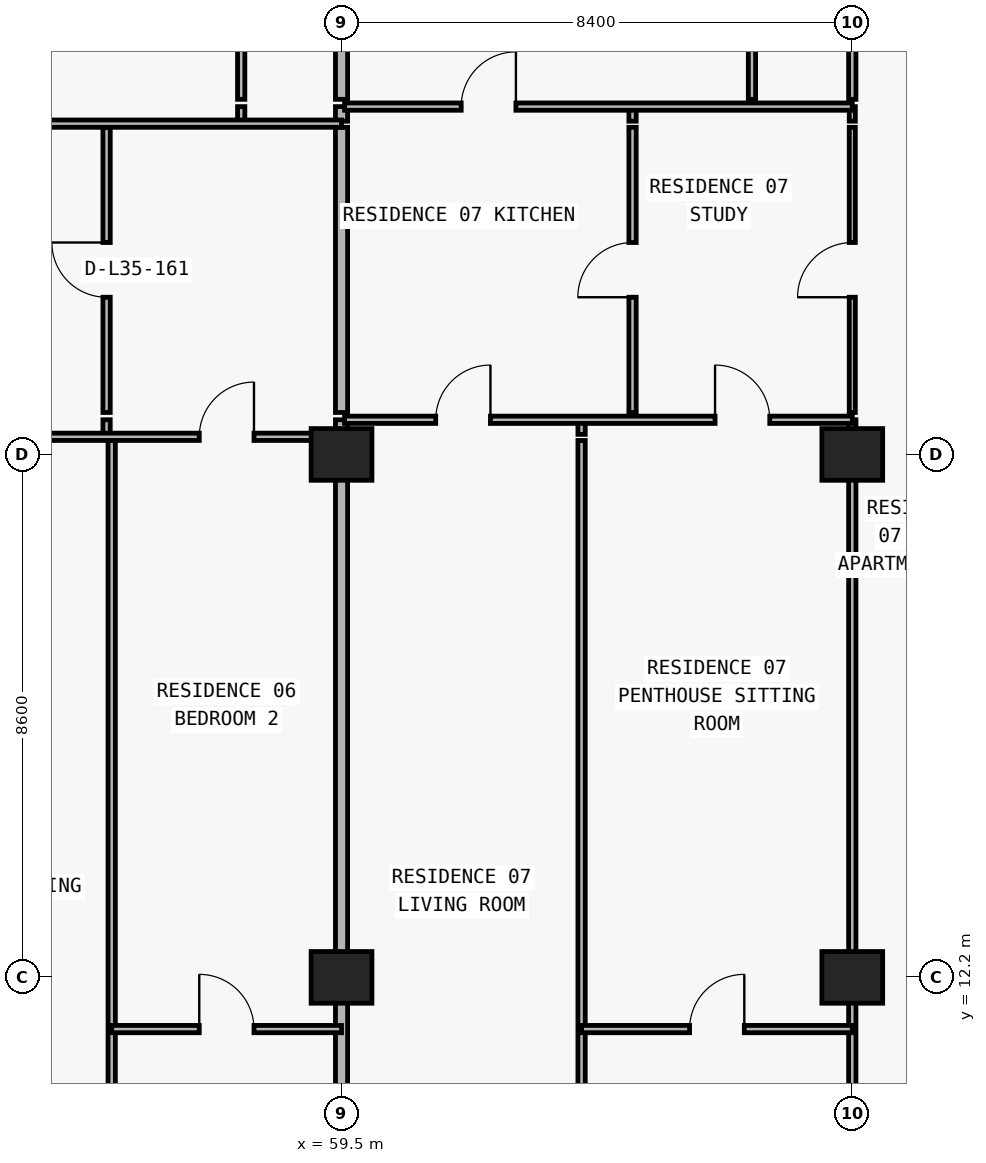
"""IFC4 building model, lengths in metres.
Left out: names, types, materials, properties, quantities, classifications, styles, units other than length and angle.
Written with IfcOpenShell. Run it as: python <this file> out.ifc"""

import sys

from ifc_helpers import new_model, si_unit, direction, frame, frame_2d, origin, origin_2d, place, context, subcontext, project, spatial, rectangle, extrude, element, fill, save


model = new_model("IFC4")
c1 = context("Model", 3, precision=1e-05, world=origin(), true_north=direction((0.0, 1.0)))
c2 = subcontext(c1, "Body", "Model", "MODEL_VIEW")
j1 = project(units=[si_unit("LENGTHUNIT", "METRE"), si_unit("PLANEANGLEUNIT", "RADIAN")], contexts=[c1])
p1 = place(None, origin())
s1 = spatial("IfcSite", under=j1, at=p1, CompositionType="ELEMENT")
p2 = place(p1, origin())
s2 = spatial("IfcBuilding", under=s1, at=p2, CompositionType="ELEMENT")
p3 = place(p2, frame((0.0, 0.0, 129.0)))
s3 = spatial("IfcBuildingStorey", under=s2, at=p3, CompositionType="ELEMENT", Elevation=129.0)
for number, where, z_axis, x_axis in (
    (1, (59.5, 12.2, 0.0), (0.0, 0.0, 1.0), (1.0, 0.0, 0.0)),
    (2, (67.9, 12.2, 0.0), (0.0, 0.0, 1.0), (1.0, 0.0, 0.0)),
    (3, (59.5, 20.8, 0.0), (0.0, 0.0, 1.0), (1.0, 0.0, 0.0)),
    (4, (67.9, 20.8, 0.0), (0.0, 0.0, 1.0), (1.0, 0.0, 0.0)),
):
    element("IfcColumn", number, at=place(p3, frame(where, z_axis=z_axis, x_axis=x_axis)), inside=s3, PredefinedType="COLUMN", context=c2, shape_type="SweptSolid", body=[
        extrude(rectangle(XDim=1.0, YDim=0.85, at=origin_2d()), origin(), (0.0, 0.0, 1.0), 3.05),
    ])
p4 = place(p3, frame((55.636, 21.13, 0.0), z_axis=(0.0, 0.0, 1.0), x_axis=(0.0, 1.0, 0.0)))
e5 = element("IfcWall", 5, at=p4, inside=s3, PredefinedType="PARTITIONING", context=c2, shape_type="SweptSolid", body=[
    extrude(rectangle(XDim=0.24, YDim=0.12, at=frame_2d((0.12, 0.0))), origin(), (0.0, 0.0, 1.0), 3.05),
])
p5 = place(p3, frame((55.636, 21.49, 0.0), z_axis=(0.0, 0.0, 1.0), x_axis=(0.0, 1.0, 0.0)))
e6 = element("IfcWall", 6, at=p5, inside=s3, PredefinedType="PARTITIONING", context=c2, shape_type="SweptSolid", body=[
    extrude(rectangle(XDim=4.69, YDim=0.12, at=frame_2d((2.345, 0.0))), origin(), (0.0, 0.0, 1.0), 3.05),
])
p6 = place(p5, frame((1.895, 0.0, 0.0)))
e7 = element("IfcOpeningElement", 7, at=p6, cuts=e6, PredefinedType="OPENING", context=c2, shape_type="SweptSolid", body=[
    extrude(rectangle(XDim=0.9, YDim=2.15, at=frame_2d((0.45, 1.075))), frame((0.0, 0.07, 0.0), z_axis=(0.0, -1.0, 0.0), x_axis=(1.0, 0.0, 0.0)), (0.0, 0.0, 1.0), 0.14),
])
p7 = place(p3, frame((55.72, 8.84, 0.0), z_axis=(0.0, 0.0, 1.0), x_axis=(0.0, 1.0, 0.0)))
e8 = element("IfcWall", 8, at=p7, inside=s3, PredefinedType="PARTITIONING", context=c2, shape_type="SweptSolid", body=[
    extrude(rectangle(XDim=12.19, YDim=0.12, at=frame_2d((6.095, 0.0))), origin(), (0.0, 0.0, 1.0), 3.05),
])
p8 = place(p3, frame((57.85, 26.28, 0.0), z_axis=(0.0, 0.0, 1.0), x_axis=(0.0, 1.0, 0.0)))
e9 = element("IfcWall", 9, at=p8, inside=s3, PredefinedType="PARTITIONING", context=c2, shape_type="SweptSolid", body=[
    extrude(rectangle(XDim=0.24, YDim=0.12, at=frame_2d((0.12, 0.0))), origin(), (0.0, 0.0, 1.0), 3.05),
])
p9 = place(p3, frame((57.85, 26.64, 0.0), z_axis=(0.0, 0.0, 1.0), x_axis=(0.0, 1.0, 0.0)))
e10 = element("IfcWall", 10, at=p9, inside=s3, PredefinedType="PARTITIONING", context=c2, shape_type="SweptSolid", body=[
    extrude(rectangle(XDim=8.06, YDim=0.12, at=frame_2d((4.03, 0.0))), origin(), (0.0, 0.0, 1.0), 3.05),
])
p10 = place(p9, frame((3.755, 0.0, 0.0)))
e11 = element("IfcOpeningElement", 11, at=p10, cuts=e10, PredefinedType="OPENING", context=c2, shape_type="SweptSolid", body=[
    extrude(rectangle(XDim=0.85, YDim=2.1, at=frame_2d((0.425, 1.05))), frame((0.0, 0.07, 0.0), z_axis=(0.0, -1.0, 0.0), x_axis=(1.0, 0.0, 0.0)), (0.0, 0.0, 1.0), 0.14),
])
p11 = place(p3, frame((59.5, 8.84, 0.0), z_axis=(0.0, 0.0, 1.0), x_axis=(0.0, 1.0, 0.0)))
e12 = element("IfcWall", 12, at=p11, inside=s3, PredefinedType="PARTITIONING", context=c2, shape_type="SweptSolid", body=[
    extrude(rectangle(XDim=12.19, YDim=0.2, at=frame_2d((6.095, 0.0))), origin(), (0.0, 0.0, 1.0), 2.174),
])
p12 = place(p3, frame((59.5, 21.13, 0.0), z_axis=(0.0, 0.0, 1.0), x_axis=(0.0, 1.0, 0.0)))
e13 = element("IfcWall", 13, at=p12, inside=s3, PredefinedType="PARTITIONING", context=c2, shape_type="SweptSolid", body=[
    extrude(rectangle(XDim=0.24, YDim=0.2, at=frame_2d((0.12, 0.0))), origin(), (0.0, 0.0, 1.0), 2.174),
])
p13 = place(p3, frame((59.5, 21.49, 0.0), z_axis=(0.0, 0.0, 1.0), x_axis=(0.0, 1.0, 0.0)))
e14 = element("IfcWall", 14, at=p13, inside=s3, PredefinedType="PARTITIONING", context=c2, shape_type="SweptSolid", body=[
    extrude(rectangle(XDim=4.69, YDim=0.2, at=frame_2d((2.345, 0.0))), origin(), (0.0, 0.0, 1.0), 2.174),
])
p14 = place(p3, frame((59.5, 26.28, 0.0), z_axis=(0.0, 0.0, 1.0), x_axis=(0.0, 1.0, 0.0)))
e15 = element("IfcWall", 15, at=p14, inside=s3, PredefinedType="PARTITIONING", context=c2, shape_type="SweptSolid", body=[
    extrude(rectangle(XDim=0.24, YDim=0.2, at=frame_2d((0.12, 0.0))), origin(), (0.0, 0.0, 1.0), 2.174),
])
p15 = place(p3, frame((59.5, 26.64, 0.0), z_axis=(0.0, 0.0, 1.0), x_axis=(0.0, 1.0, 0.0)))
e16 = element("IfcWall", 16, at=p15, inside=s3, PredefinedType="PARTITIONING", context=c2, shape_type="SweptSolid", body=[
    extrude(rectangle(XDim=8.06, YDim=0.2, at=frame_2d((4.03, 0.0))), origin(), (0.0, 0.0, 1.0), 2.174),
])
p16 = place(p3, frame((63.448, 8.84, 0.0), z_axis=(0.0, 0.0, 1.0), x_axis=(0.0, 1.0, 0.0)))
e17 = element("IfcWall", 17, at=p16, inside=s3, PredefinedType="PARTITIONING", context=c2, shape_type="SweptSolid", body=[
    extrude(rectangle(XDim=12.19, YDim=0.12, at=frame_2d((6.095, 0.0))), origin(), (0.0, 0.0, 1.0), 3.05),
])
p17 = place(p3, frame((63.448, 21.13, 0.0), z_axis=(0.0, 0.0, 1.0), x_axis=(0.0, 1.0, 0.0)))
e18 = element("IfcWall", 18, at=p17, inside=s3, PredefinedType="PARTITIONING", context=c2, shape_type="SweptSolid", body=[
    extrude(rectangle(XDim=0.24, YDim=0.12, at=frame_2d((0.12, 0.0))), origin(), (0.0, 0.0, 1.0), 3.05),
])
p18 = place(p3, frame((64.286, 21.49, 0.0), z_axis=(0.0, 0.0, 1.0), x_axis=(0.0, 1.0, 0.0)))
e19 = element("IfcWall", 19, at=p18, inside=s3, PredefinedType="PARTITIONING", context=c2, shape_type="SweptSolid", body=[
    extrude(rectangle(XDim=4.69, YDim=0.12, at=frame_2d((2.345, 0.0))), origin(), (0.0, 0.0, 1.0), 3.05),
])
p19 = place(p18, frame((1.895, 0.0, 0.0)))
e20 = element("IfcOpeningElement", 20, at=p19, cuts=e19, PredefinedType="OPENING", context=c2, shape_type="SweptSolid", body=[
    extrude(rectangle(XDim=0.9, YDim=2.15, at=frame_2d((0.45, 1.075))), frame((0.0, 0.07, 0.0), z_axis=(0.0, -1.0, 0.0), x_axis=(1.0, 0.0, 0.0)), (0.0, 0.0, 1.0), 0.14),
])
p20 = place(p3, frame((64.286, 26.28, 0.0), z_axis=(0.0, 0.0, 1.0), x_axis=(0.0, 1.0, 0.0)))
e21 = element("IfcWall", 21, at=p20, inside=s3, PredefinedType="PARTITIONING", context=c2, shape_type="SweptSolid", body=[
    extrude(rectangle(XDim=0.24, YDim=0.12, at=frame_2d((0.12, 0.0))), origin(), (0.0, 0.0, 1.0), 3.05),
])
p21 = place(p3, frame((66.25, 26.64, 0.0), z_axis=(0.0, 0.0, 1.0), x_axis=(0.0, 1.0, 0.0)))
e22 = element("IfcWall", 22, at=p21, inside=s3, PredefinedType="PARTITIONING", context=c2, shape_type="SweptSolid", body=[
    extrude(rectangle(XDim=8.06, YDim=0.12, at=frame_2d((4.03, 0.0))), origin(), (0.0, 0.0, 1.0), 3.05),
])
p22 = place(p21, frame((3.755, 0.0, 0.0)))
e23 = element("IfcOpeningElement", 23, at=p22, cuts=e22, PredefinedType="OPENING", context=c2, shape_type="SweptSolid", body=[
    extrude(rectangle(XDim=0.85, YDim=2.1, at=frame_2d((0.425, 1.05))), frame((0.0, 0.07, 0.0), z_axis=(0.0, -1.0, 0.0), x_axis=(1.0, 0.0, 0.0)), (0.0, 0.0, 1.0), 0.14),
])
p23 = place(p3, frame((67.9, 8.84, 0.0), z_axis=(0.0, 0.0, 1.0), x_axis=(0.0, 1.0, 0.0)))
e24 = element("IfcWall", 24, at=p23, inside=s3, PredefinedType="PARTITIONING", context=c2, shape_type="SweptSolid", body=[
    extrude(rectangle(XDim=12.19, YDim=0.12, at=frame_2d((6.095, 0.0))), origin(), (0.0, 0.0, 1.0), 2.174),
])
p24 = place(p3, frame((67.9, 21.13, 0.0), z_axis=(0.0, 0.0, 1.0), x_axis=(0.0, 1.0, 0.0)))
e25 = element("IfcWall", 25, at=p24, inside=s3, PredefinedType="PARTITIONING", context=c2, shape_type="SweptSolid", body=[
    extrude(rectangle(XDim=0.24, YDim=0.12, at=frame_2d((0.12, 0.0))), origin(), (0.0, 0.0, 1.0), 2.174),
])
p25 = place(p3, frame((67.9, 21.49, 0.0), z_axis=(0.0, 0.0, 1.0), x_axis=(0.0, 1.0, 0.0)))
e26 = element("IfcWall", 26, at=p25, inside=s3, PredefinedType="MOVABLE", context=c2, shape_type="SweptSolid", body=[
    extrude(rectangle(XDim=4.69, YDim=0.1, at=frame_2d((2.345, 0.0))), origin(), (0.0, 0.0, 1.0), 2.174),
])
p26 = place(p25, frame((1.895, 0.0, 0.0)))
e27 = element("IfcOpeningElement", 27, at=p26, cuts=e26, PredefinedType="OPENING", context=c2, shape_type="SweptSolid", body=[
    extrude(rectangle(XDim=0.9, YDim=2.124, at=frame_2d((0.45, 1.062))), frame((0.0, 0.06, 0.0), z_axis=(0.0, -1.0, 0.0), x_axis=(1.0, 0.0, 0.0)), (0.0, 0.0, 1.0), 0.12),
])
p27 = place(p3, frame((67.9, 26.28, 0.0), z_axis=(0.0, 0.0, 1.0), x_axis=(0.0, 1.0, 0.0)))
e28 = element("IfcWall", 28, at=p27, inside=s3, PredefinedType="MOVABLE", context=c2, shape_type="SweptSolid", body=[
    extrude(rectangle(XDim=0.24, YDim=0.1, at=frame_2d((0.12, 0.0))), origin(), (0.0, 0.0, 1.0), 2.174),
])
p28 = place(p3, frame((67.9, 26.64, 0.0), z_axis=(0.0, 0.0, 1.0), x_axis=(0.0, 1.0, 0.0)))
e29 = element("IfcWall", 29, at=p28, inside=s3, PredefinedType="PARTITIONING", context=c2, shape_type="SweptSolid", body=[
    extrude(rectangle(XDim=8.06, YDim=0.12, at=frame_2d((4.03, 0.0))), origin(), (0.0, 0.0, 1.0), 2.174),
])
p29 = place(p3, frame((55.72, 11.35, 0.0), z_axis=(0.0, 0.0, 1.0), x_axis=(1.0, 0.0, 0.0)))
e30 = element("IfcWall", 30, at=p29, inside=s3, PredefinedType="PARTITIONING", context=c2, shape_type="SweptSolid", body=[
    extrude(rectangle(XDim=3.78, YDim=0.12, at=frame_2d((1.89, 0.0))), origin(), (0.0, 0.0, 1.0), 3.05),
])
p30 = place(p29, frame((1.44, 0.0, 0.0)))
e31 = element("IfcOpeningElement", 31, at=p30, cuts=e30, PredefinedType="OPENING", context=c2, shape_type="SweptSolid", body=[
    extrude(rectangle(XDim=0.9, YDim=2.15, at=frame_2d((0.45, 1.075))), frame((0.0, 0.07, 0.0), z_axis=(0.0, -1.0, 0.0), x_axis=(1.0, 0.0, 0.0)), (0.0, 0.0, 1.0), 0.14),
])
p31 = place(p3, frame((63.448, 11.35, 0.0), z_axis=(0.0, 0.0, 1.0), x_axis=(1.0, 0.0, 0.0)))
e32 = element("IfcWall", 32, at=p31, inside=s3, PredefinedType="PARTITIONING", context=c2, shape_type="SweptSolid", body=[
    extrude(rectangle(XDim=4.452, YDim=0.12, at=frame_2d((2.226, 0.0))), origin(), (0.0, 0.0, 1.0), 3.05),
])
p32 = place(p31, frame((1.776, 0.0, 0.0)))
e33 = element("IfcOpeningElement", 33, at=p32, cuts=e32, PredefinedType="OPENING", context=c2, shape_type="SweptSolid", body=[
    extrude(rectangle(XDim=0.9, YDim=2.15, at=frame_2d((0.45, 1.075))), frame((0.0, 0.07, 0.0), z_axis=(0.0, -1.0, 0.0), x_axis=(1.0, 0.0, 0.0)), (0.0, 0.0, 1.0), 0.14),
])
p33 = place(p3, frame((51.32, 21.09, 0.0), z_axis=(0.0, 0.0, 1.0), x_axis=(1.0, 0.0, 0.0)))
e34 = element("IfcWall", 34, at=p33, inside=s3, PredefinedType="PARTITIONING", context=c2, shape_type="SweptSolid", body=[
    extrude(rectangle(XDim=8.18, YDim=0.12, at=frame_2d((4.09, 0.0))), origin(), (0.0, 0.0, 1.0), 2.174),
])
p34 = place(p33, frame((1.708, 0.0, 0.0)))
e35 = element("IfcOpeningElement", 35, at=p34, cuts=e34, PredefinedType="OPENING", context=c2, shape_type="SweptSolid", body=[
    extrude(rectangle(XDim=0.9, YDim=2.124, at=frame_2d((0.45, 1.062))), frame((0.0, 0.07, 0.0), z_axis=(0.0, -1.0, 0.0), x_axis=(1.0, 0.0, 0.0)), (0.0, 0.0, 1.0), 0.14),
])
p35 = place(p33, frame((5.84, 0.0, 0.0)))
e36 = element("IfcOpeningElement", 36, at=p35, cuts=e34, PredefinedType="OPENING", context=c2, shape_type="SweptSolid", body=[
    extrude(rectangle(XDim=0.9, YDim=2.124, at=frame_2d((0.45, 1.062))), frame((0.0, 0.07, 0.0), z_axis=(0.0, -1.0, 0.0), x_axis=(1.0, 0.0, 0.0)), (0.0, 0.0, 1.0), 0.14),
])
p36 = place(p3, frame((59.55, 21.37, 0.0), z_axis=(0.0, 0.0, 1.0), x_axis=(1.0, 0.0, 0.0)))
e37 = element("IfcWall", 37, at=p36, inside=s3, PredefinedType="PARTITIONING", context=c2, shape_type="SweptSolid", body=[
    extrude(rectangle(XDim=8.35, YDim=0.12, at=frame_2d((4.175, 0.0))), origin(), (0.0, 0.0, 1.0), 3.05),
])
p37 = place(p36, frame((1.499, 0.0, 0.0)))
e38 = element("IfcOpeningElement", 38, at=p37, cuts=e37, PredefinedType="OPENING", context=c2, shape_type="SweptSolid", body=[
    extrude(rectangle(XDim=0.9, YDim=2.15, at=frame_2d((0.45, 1.075))), frame((0.0, 0.07, 0.0), z_axis=(0.0, -1.0, 0.0), x_axis=(1.0, 0.0, 0.0)), (0.0, 0.0, 1.0), 0.14),
])
p38 = place(p36, frame((6.093, 0.0, 0.0)))
e39 = element("IfcOpeningElement", 39, at=p38, cuts=e37, PredefinedType="OPENING", context=c2, shape_type="SweptSolid", body=[
    extrude(rectangle(XDim=0.9, YDim=2.15, at=frame_2d((0.45, 1.075))), frame((0.0, 0.07, 0.0), z_axis=(0.0, -1.0, 0.0), x_axis=(1.0, 0.0, 0.0)), (0.0, 0.0, 1.0), 0.14),
])
p39 = place(p3, frame((51.32, 26.24, 0.0), z_axis=(0.0, 0.0, 1.0), x_axis=(1.0, 0.0, 0.0)))
e40 = element("IfcWall", 40, at=p39, inside=s3, PredefinedType="PARTITIONING", context=c2, shape_type="SweptSolid", body=[
    extrude(rectangle(XDim=8.18, YDim=0.12, at=frame_2d((4.09, 0.0))), origin(), (0.0, 0.0, 1.0), 3.05),
])
p40 = place(p39, frame((1.708, 0.0, 0.0)))
e41 = element("IfcOpeningElement", 41, at=p40, cuts=e40, PredefinedType="OPENING", context=c2, shape_type="SweptSolid", body=[
    extrude(rectangle(XDim=0.9, YDim=2.15, at=frame_2d((0.45, 1.075))), frame((0.0, 0.07, 0.0), z_axis=(0.0, -1.0, 0.0), x_axis=(1.0, 0.0, 0.0)), (0.0, 0.0, 1.0), 0.14),
])
p41 = place(p3, frame((59.55, 26.52, 0.0), z_axis=(0.0, 0.0, 1.0), x_axis=(1.0, 0.0, 0.0)))
e42 = element("IfcWall", 42, at=p41, inside=s3, PredefinedType="PARTITIONING", context=c2, shape_type="SweptSolid", body=[
    extrude(rectangle(XDim=8.35, YDim=0.12, at=frame_2d((4.175, 0.0))), origin(), (0.0, 0.0, 1.0), 3.05),
])
p42 = place(p41, frame((1.918, 0.0, 0.0)))
e43 = element("IfcOpeningElement", 43, at=p42, cuts=e42, PredefinedType="OPENING", context=c2, shape_type="SweptSolid", body=[
    extrude(rectangle(XDim=0.9, YDim=2.15, at=frame_2d((0.45, 1.075))), frame((0.0, 0.07, 0.0), z_axis=(0.0, -1.0, 0.0), x_axis=(1.0, 0.0, 0.0)), (0.0, 0.0, 1.0), 0.14),
])
p43 = place(p6, origin())
e44 = element("IfcDoor", 44, at=p43, inside=s3, OperationType="SINGLE_SWING_RIGHT", PredefinedType="DOOR", context=c2, shape_type="SweptSolid", body=[
    extrude(rectangle(XDim=0.9, YDim=2.15, at=frame_2d((0.45, 1.075))), frame((0.0, 0.025, 0.0), z_axis=(0.0, -1.0, 0.0), x_axis=(1.0, 0.0, 0.0)), (0.0, 0.0, 1.0), 0.05),
])
fill(e7, e44)
p44 = place(p35, origin())
e45 = element("IfcDoor", 45, at=p44, inside=s3, OperationType="SINGLE_SWING_RIGHT", PredefinedType="DOOR", context=c2, shape_type="SweptSolid", body=[
    extrude(rectangle(XDim=0.9, YDim=2.124, at=frame_2d((0.45, 1.062))), frame((0.0, 0.025, 0.0), z_axis=(0.0, -1.0, 0.0), x_axis=(1.0, 0.0, 0.0)), (0.0, 0.0, 1.0), 0.05),
])
fill(e36, e45)
p45 = place(p30, origin())
e46 = element("IfcDoor", 46, at=p45, inside=s3, OperationType="SINGLE_SWING_LEFT", PredefinedType="DOOR", context=c2, shape_type="SweptSolid", body=[
    extrude(rectangle(XDim=0.9, YDim=2.15, at=frame_2d((0.45, 1.075))), frame((0.0, 0.025, 0.0), z_axis=(0.0, -1.0, 0.0), x_axis=(1.0, 0.0, 0.0)), (0.0, 0.0, 1.0), 0.05),
])
fill(e31, e46)
p46 = place(p42, origin())
e47 = element("IfcDoor", 47, at=p46, inside=s3, OperationType="SINGLE_SWING_RIGHT", PredefinedType="DOOR", context=c2, shape_type="SweptSolid", body=[
    extrude(rectangle(XDim=0.9, YDim=2.15, at=frame_2d((0.45, 1.075))), frame((0.0, 0.025, 0.0), z_axis=(0.0, -1.0, 0.0), x_axis=(1.0, 0.0, 0.0)), (0.0, 0.0, 1.0), 0.05),
])
fill(e43, e47)
p47 = place(p19, origin())
e48 = element("IfcDoor", 48, at=p47, inside=s3, OperationType="SINGLE_SWING_LEFT", PredefinedType="DOOR", context=c2, shape_type="SweptSolid", body=[
    extrude(rectangle(XDim=0.9, YDim=2.15, at=frame_2d((0.45, 1.075))), frame((0.0, 0.025, 0.0), z_axis=(0.0, -1.0, 0.0), x_axis=(1.0, 0.0, 0.0)), (0.0, 0.0, 1.0), 0.05),
])
fill(e20, e48)
p48 = place(p37, origin())
e49 = element("IfcDoor", 49, at=p48, inside=s3, OperationType="SINGLE_SWING_RIGHT", PredefinedType="DOOR", context=c2, shape_type="SweptSolid", body=[
    extrude(rectangle(XDim=0.9, YDim=2.15, at=frame_2d((0.45, 1.075))), frame((0.0, 0.025, 0.0), z_axis=(0.0, -1.0, 0.0), x_axis=(1.0, 0.0, 0.0)), (0.0, 0.0, 1.0), 0.05),
])
fill(e38, e49)
p49 = place(p38, origin())
e50 = element("IfcDoor", 50, at=p49, inside=s3, OperationType="SINGLE_SWING_LEFT", PredefinedType="DOOR", context=c2, shape_type="SweptSolid", body=[
    extrude(rectangle(XDim=0.9, YDim=2.15, at=frame_2d((0.45, 1.075))), frame((0.0, 0.025, 0.0), z_axis=(0.0, -1.0, 0.0), x_axis=(1.0, 0.0, 0.0)), (0.0, 0.0, 1.0), 0.05),
])
fill(e39, e50)
p50 = place(p32, origin())
e51 = element("IfcDoor", 51, at=p50, inside=s3, OperationType="SINGLE_SWING_RIGHT", PredefinedType="DOOR", context=c2, shape_type="SweptSolid", body=[
    extrude(rectangle(XDim=0.9, YDim=2.15, at=frame_2d((0.45, 1.075))), frame((0.0, 0.025, 0.0), z_axis=(0.0, -1.0, 0.0), x_axis=(1.0, 0.0, 0.0)), (0.0, 0.0, 1.0), 0.05),
])
fill(e33, e51)
p51 = place(p26, origin())
e52 = element("IfcDoor", 52, at=p51, inside=s3, OperationType="SINGLE_SWING_LEFT", PredefinedType="DOOR", context=c2, shape_type="SweptSolid", body=[
    extrude(rectangle(XDim=0.9, YDim=2.124, at=frame_2d((0.45, 1.062))), frame((0.0, 0.025, 0.0), z_axis=(0.0, -1.0, 0.0), x_axis=(1.0, 0.0, 0.0)), (0.0, 0.0, 1.0), 0.05),
])
fill(e27, e52)
save(model, sys.argv[1])
